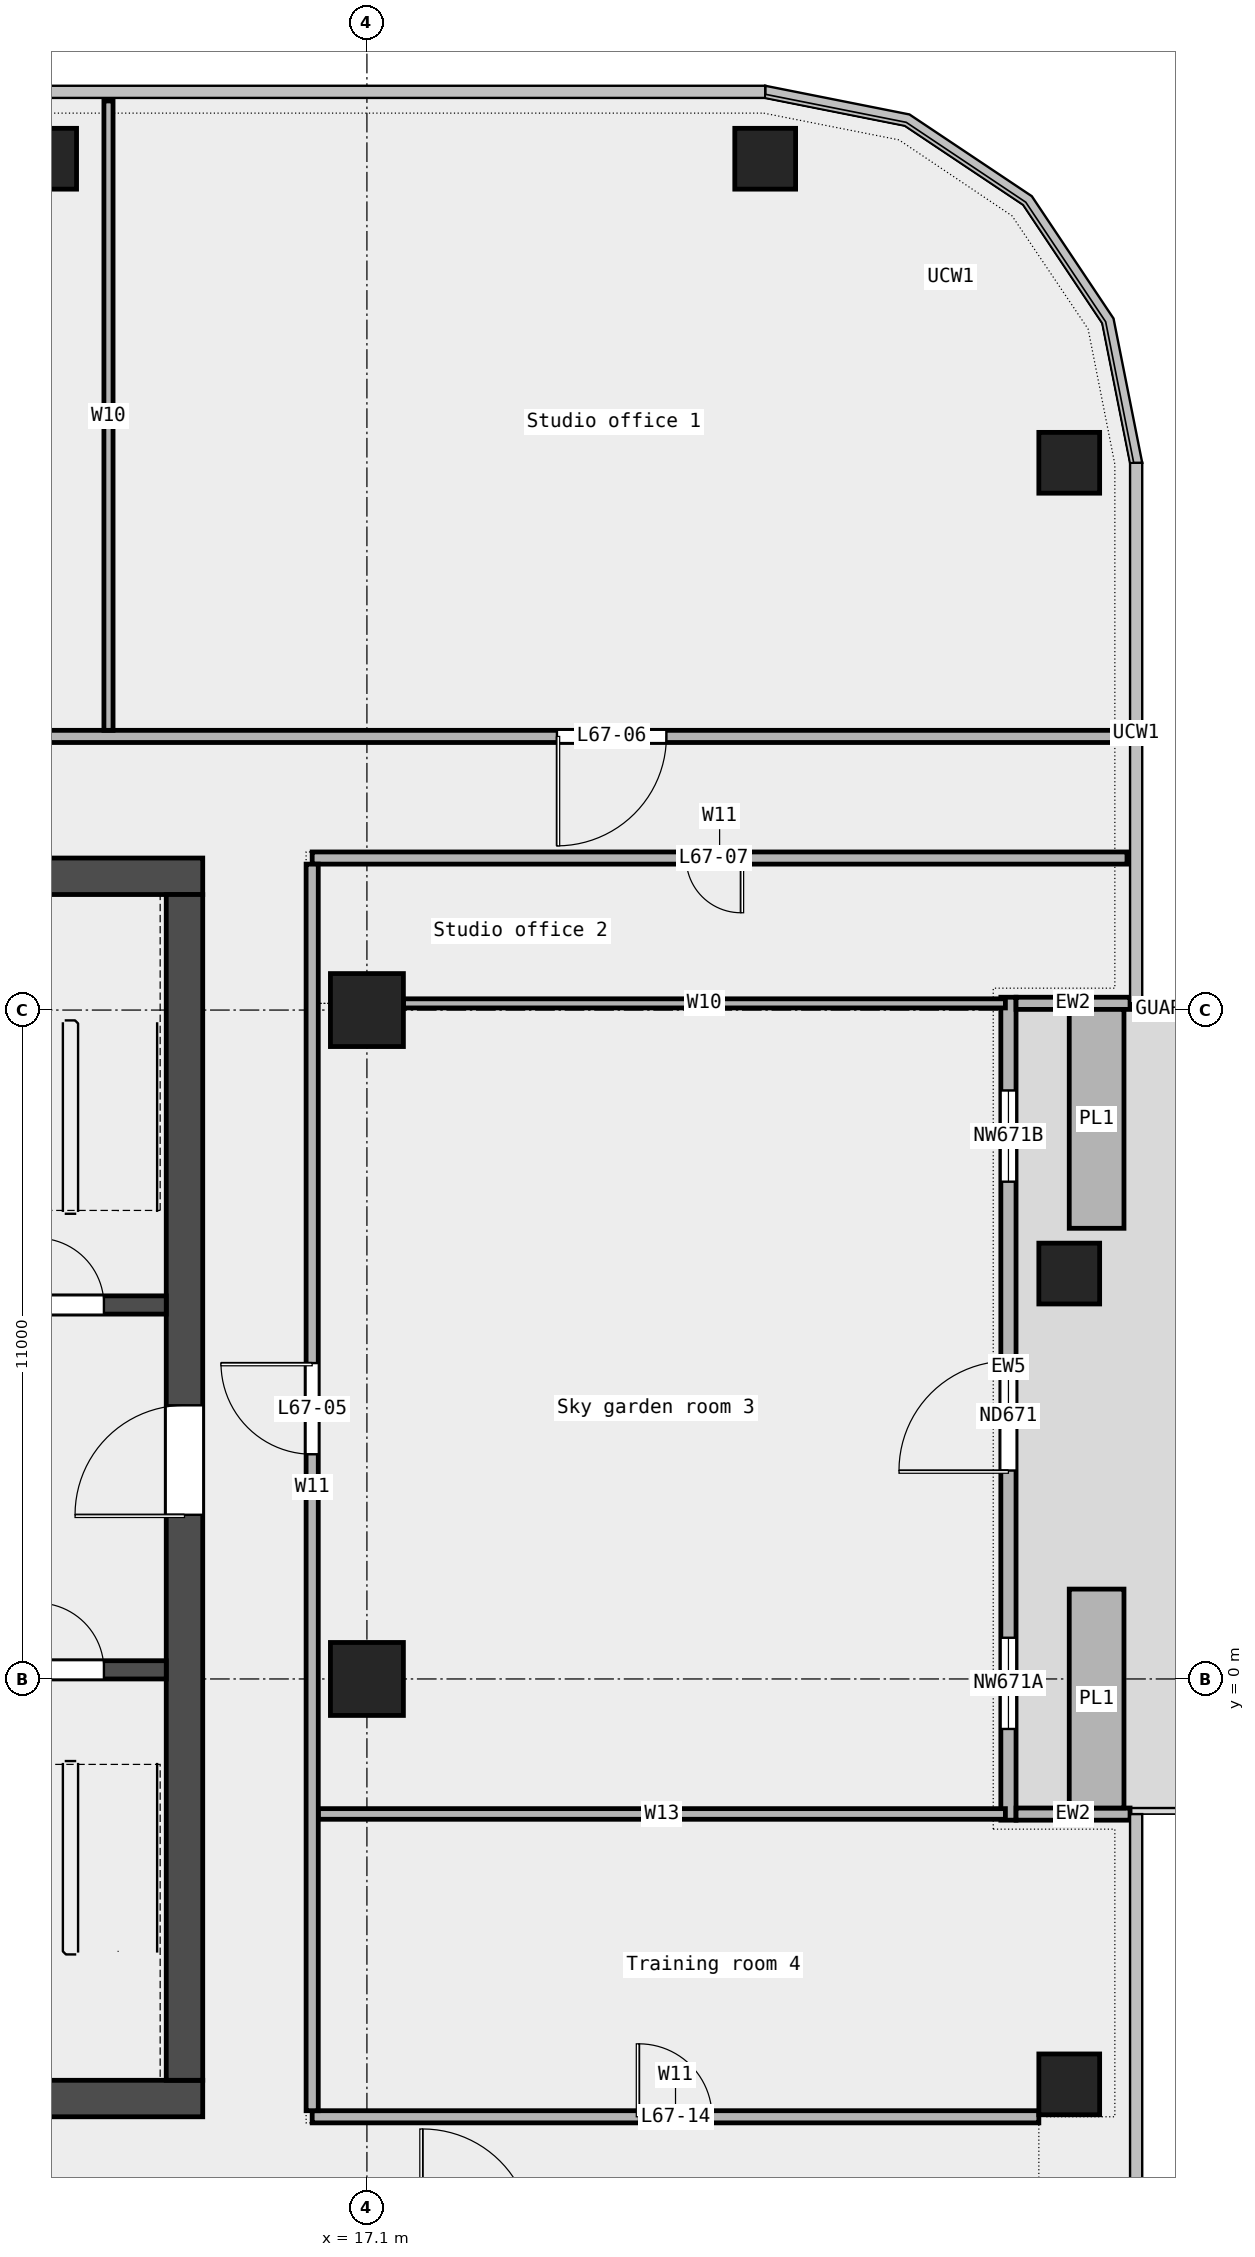
"""IFC4 building model, lengths in metres.
Left out: names, types, materials, properties, quantities, classifications, styles, units other than length and angle.
Written with IfcOpenShell. Run it as: python <this file> out.ifc"""

import sys

from ifc_helpers import new_model, si_unit, direction, frame, frame_2d, origin, origin_2d, place, context, subcontext, project, spatial, rectangle, extrude, element, fill, save


model = new_model("IFC4")
c1 = context("Model", 3, precision=1e-05, world=origin(), true_north=direction((0.0, 1.0)))
c2 = subcontext(c1, "Body", "Model", "MODEL_VIEW")
j1 = project(units=[si_unit("LENGTHUNIT", "METRE"), si_unit("PLANEANGLEUNIT", "RADIAN")], contexts=[c1])
p1 = place(None, origin())
s1 = spatial("IfcSite", under=j1, at=p1, CompositionType="ELEMENT")
p2 = place(p1, origin())
s2 = spatial("IfcBuilding", under=s1, at=p2, CompositionType="ELEMENT")
p3 = place(p2, frame((0.0, 0.0, 307.4)))
s3 = spatial("IfcBuildingStorey", under=s2, at=p3, CompositionType="ELEMENT", Elevation=307.4)
for number, where, z_axis, x_axis in (
    (1, (28.65, -6.667, 0.0), (0.0, 0.0, 1.0), (1.0, 0.0, 0.0)),
    (2, (28.65, 6.667, 0.0), (0.0, 0.0, 1.0), (1.0, 0.0, 0.0)),
    (3, (28.65, 20.0, 0.0), (0.0, 0.0, 1.0), (1.0, 0.0, 0.0)),
    (4, (23.65, 25.0, 0.0), (0.0, 0.0, 1.0), (1.0, 0.0, 0.0)),
    (5, (11.825, 25.0, 0.0), (0.0, 0.0, 1.0), (1.0, 0.0, 0.0)),
):
    element("IfcColumn", number, at=place(p3, frame(where, z_axis=z_axis, x_axis=x_axis)), inside=s3, PredefinedType="COLUMN", context=c2, shape_type="SweptSolid", body=[
        extrude(rectangle(XDim=1.0, YDim=1.0, at=origin_2d()), origin(), (0.0, 0.0, 1.0), 3.6),
    ])
for number, where, z_axis, x_axis in (
    (6, (17.1, 0.0, 0.0), (0.0, 0.0, 1.0), (1.0, 0.0, 0.0)),
    (7, (17.1, 11.0, 0.0), (0.0, 0.0, 1.0), (1.0, 0.0, 0.0)),
):
    element("IfcColumn", number, at=place(p3, frame(where, z_axis=z_axis, x_axis=x_axis)), inside=s3, PredefinedType="COLUMN", context=c2, shape_type="SweptSolid", body=[
        extrude(rectangle(XDim=1.2, YDim=1.2, at=origin_2d()), origin(), (0.0, 0.0, 1.0), 3.6),
    ])
p4 = place(p3, frame((27.65, -2.322, 0.0), z_axis=(0.0, 0.0, 1.0), x_axis=(0.0, 1.0, 0.0)))
e8 = element("IfcWall", 8, at=p4, inside=s3, PredefinedType="STANDARD", context=c2, shape_type="SweptSolid", body=[
    extrude(rectangle(XDim=13.533, YDim=0.25, at=frame_2d((6.767, 0.0))), origin(), (0.0, 0.0, 1.0), 3.6),
])
p5 = place(p4, frame((1.5, 0.0, 0.45)))
e9 = element("IfcOpeningElement", 9, at=p5, cuts=e8, PredefinedType="OPENING", context=c2, shape_type="SweptSolid", body=[
    extrude(rectangle(XDim=1.5, YDim=2.4, at=frame_2d((0.75, 1.2))), frame((0.0, 0.137, 0.0), z_axis=(0.0, -1.0, 0.0), x_axis=(1.0, 0.0, 0.0)), (0.0, 0.0, 1.0), 0.274),
])
p6 = place(p4, frame((5.75, 0.0, 0.0)))
e10 = element("IfcOpeningElement", 10, at=p6, cuts=e8, PredefinedType="OPENING", context=c2, shape_type="SweptSolid", body=[
    extrude(rectangle(XDim=1.8, YDim=2.4, at=frame_2d((0.9, 1.2))), frame((0.0, 0.137, 0.0), z_axis=(0.0, -1.0, 0.0), x_axis=(1.0, 0.0, 0.0)), (0.0, 0.0, 1.0), 0.274),
])
p7 = place(p4, frame((10.5, 0.0, 0.45)))
e11 = element("IfcOpeningElement", 11, at=p7, cuts=e8, PredefinedType="OPENING", context=c2, shape_type="SweptSolid", body=[
    extrude(rectangle(XDim=1.5, YDim=2.4, at=frame_2d((0.75, 1.2))), frame((0.0, 0.137, 0.0), z_axis=(0.0, -1.0, 0.0), x_axis=(1.0, 0.0, 0.0)), (0.0, 0.0, 1.0), 0.274),
])
for number, where, z_axis, x_axis in (
    (12, (29.65, -2.222, 0.0), (0.0, 0.0, 1.0), (-1.0, 0.0, 0.0)),
    (13, (29.65, 11.111, 0.0), (0.0, 0.0, 1.0), (-1.0, 0.0, 0.0)),
):
    element("IfcWall", number, at=place(p3, frame(where, z_axis=z_axis, x_axis=x_axis)), inside=s3, PredefinedType="STANDARD", context=c2, shape_type="SweptSolid", body=[
        extrude(rectangle(XDim=1.875, YDim=0.2, at=frame_2d((0.938, 0.0))), origin(), (0.0, 0.0, 1.0), 3.6),
    ])
for number, where, z_axis, x_axis in (
    (14, (29.1, -2.122, 0.0), (0.0, 0.0, 1.0), (0.0, 1.0, 0.0)),
    (15, (29.1, 7.411, 0.0), (0.0, 0.0, 1.0), (0.0, 1.0, 0.0)),
):
    element("IfcWall", number, at=place(p3, frame(where, z_axis=z_axis, x_axis=x_axis)), inside=s3, PredefinedType="STANDARD", context=c2, shape_type="SweptSolid", body=[
        extrude(rectangle(XDim=3.6, YDim=0.9, at=frame_2d((1.8, 0.0))), origin(), (0.0, 0.0, 1.0), 0.7),
    ])
p8 = place(p3, frame((16.2, -7.2, 0.0), z_axis=(0.0, 0.0, 1.0), x_axis=(1.0, 0.0, 0.0)))
e16 = element("IfcWall", 16, at=p8, inside=s3, PredefinedType="PARTITIONING", context=c2, shape_type="SweptSolid", body=[
    extrude(rectangle(XDim=11.95, YDim=0.2, at=frame_2d((5.975, 0.0))), origin(), (0.0, 0.0, 1.0), 3.6),
])
p9 = place(p8, frame((5.375, 0.0, 0.0)))
e17 = element("IfcOpeningElement", 17, at=p9, cuts=e16, PredefinedType="OPENING", context=c2, shape_type="SweptSolid", body=[
    extrude(rectangle(XDim=1.2, YDim=2.1, at=frame_2d((0.6, 1.05))), frame((0.0, 0.112, 0.0), z_axis=(0.0, -1.0, 0.0), x_axis=(1.0, 0.0, 0.0)), (0.0, 0.0, 1.0), 0.224),
])
p10 = place(p3, frame((16.3, -2.22, 0.0), z_axis=(0.0, 0.0, 1.0), x_axis=(1.0, 0.0, 0.0)))
e18 = element("IfcWall", 18, at=p10, inside=s3, PredefinedType="PARTITIONING", context=c2, shape_type="SweptSolid", body=[
    extrude(rectangle(XDim=11.3, YDim=0.175, at=frame_2d((5.65, 0.0))), origin(), (0.0, 0.0, 1.0), 3.6),
])
p11 = place(p3, frame((17.7, 11.11, 0.0), z_axis=(0.0, 0.0, 1.0), x_axis=(1.0, 0.0, 0.0)))
e19 = element("IfcWall", 19, at=p11, inside=s3, PredefinedType="PARTITIONING", context=c2, shape_type="SweptSolid", body=[
    extrude(rectangle(XDim=9.9, YDim=0.15, at=frame_2d((4.95, 0.0))), origin(), (0.0, 0.0, 1.0), 3.6),
])
p12 = place(p3, frame((16.2, 13.5, 0.0), z_axis=(0.0, 0.0, 1.0), x_axis=(1.0, 0.0, 0.0)))
e20 = element("IfcWall", 20, at=p12, inside=s3, PredefinedType="PARTITIONING", context=c2, shape_type="SweptSolid", body=[
    extrude(rectangle(XDim=13.4, YDim=0.2, at=frame_2d((6.7, 0.0))), origin(), (0.0, 0.0, 1.0), 3.6),
])
p13 = place(p12, frame((6.15, 0.0, 0.0)))
e21 = element("IfcOpeningElement", 21, at=p13, cuts=e20, PredefinedType="OPENING", context=c2, shape_type="SweptSolid", body=[
    extrude(rectangle(XDim=0.9, YDim=2.1, at=frame_2d((0.45, 1.05))), frame((0.0, 0.112, 0.0), z_axis=(0.0, -1.0, 0.0), x_axis=(1.0, 0.0, 0.0)), (0.0, 0.0, 1.0), 0.224),
])
p14 = place(p3, frame((-29.6, 15.5, 0.0), z_axis=(0.0, 0.0, 1.0), x_axis=(1.0, 0.0, 0.0)))
e22 = element("IfcWall", 22, at=p14, inside=s3, PredefinedType="PARTITIONING", context=c2, shape_type="SweptSolid", body=[
    extrude(rectangle(XDim=59.2, YDim=0.2, at=frame_2d((29.6, 0.0))), origin(), (0.0, 0.0, 1.0), 3.6),
])
p15 = place(p14, frame((20.25, 0.0, 0.0)))
e23 = element("IfcOpeningElement", 23, at=p15, cuts=e22, PredefinedType="OPENING", context=c2, shape_type="SweptSolid", body=[
    extrude(rectangle(XDim=1.5, YDim=2.1, at=frame_2d((0.75, 1.05))), frame((0.0, 0.112, 0.0), z_axis=(0.0, -1.0, 0.0), x_axis=(1.0, 0.0, 0.0)), (0.0, 0.0, 1.0), 0.224),
])
p16 = place(p14, frame((49.825, 0.0, 0.0)))
e24 = element("IfcOpeningElement", 24, at=p16, cuts=e22, PredefinedType="OPENING", context=c2, shape_type="SweptSolid", body=[
    extrude(rectangle(XDim=1.8, YDim=2.1, at=frame_2d((0.9, 1.05))), frame((0.0, 0.112, 0.0), z_axis=(0.0, -1.0, 0.0), x_axis=(1.0, 0.0, 0.0)), (0.0, 0.0, 1.0), 0.224),
])
p17 = place(p14, frame((34.05, 0.0, 0.0)))
e25 = element("IfcOpeningElement", 25, at=p17, cuts=e22, PredefinedType="OPENING", context=c2, shape_type="SweptSolid", body=[
    extrude(rectangle(XDim=1.8, YDim=2.1, at=frame_2d((0.9, 1.05))), frame((0.0, 0.112, 0.0), z_axis=(0.0, -1.0, 0.0), x_axis=(1.0, 0.0, 0.0)), (0.0, 0.0, 1.0), 0.224),
])
p18 = place(p14, frame((6.625, 0.0, 0.0)))
e26 = element("IfcOpeningElement", 26, at=p18, cuts=e22, PredefinedType="OPENING", context=c2, shape_type="SweptSolid", body=[
    extrude(rectangle(XDim=1.5, YDim=2.1, at=frame_2d((0.75, 1.05))), frame((0.0, 0.112, 0.0), z_axis=(0.0, -1.0, 0.0), x_axis=(1.0, 0.0, 0.0)), (0.0, 0.0, 1.0), 0.224),
])
p19 = place(p3, frame((12.85, 15.6, 0.0), z_axis=(0.0, 0.0, 1.0), x_axis=(0.0, 1.0, 0.0)))
e27 = element("IfcWall", 27, at=p19, inside=s3, PredefinedType="PARTITIONING", context=c2, shape_type="SweptSolid", body=[
    extrude(rectangle(XDim=10.35, YDim=0.15, at=frame_2d((5.175, 0.0))), origin(), (0.0, 0.0, 1.0), 3.6),
])
p20 = place(p3, frame((16.2, -7.1, 0.0), z_axis=(0.0, 0.0, 1.0), x_axis=(0.0, 1.0, 0.0)))
e28 = element("IfcWall", 28, at=p20, inside=s3, PredefinedType="PARTITIONING", context=c2, shape_type="SweptSolid", body=[
    extrude(rectangle(XDim=20.5, YDim=0.2, at=frame_2d((10.25, 0.0))), origin(), (0.0, 0.0, 1.0), 3.6),
])
p21 = place(p20, frame((10.795, 0.0, 0.0)))
e29 = element("IfcOpeningElement", 29, at=p21, cuts=e28, PredefinedType="OPENING", context=c2, shape_type="SweptSolid", body=[
    extrude(rectangle(XDim=1.5, YDim=2.1, at=frame_2d((0.75, 1.05))), frame((0.0, 0.112, 0.0), z_axis=(0.0, -1.0, 0.0), x_axis=(1.0, 0.0, 0.0)), (0.0, 0.0, 1.0), 0.224),
])
p22 = place(p3, frame((-14.4, -6.9, 0.0), z_axis=(0.0, 0.0, 1.0), x_axis=(1.0, 0.0, 0.0)))
e30 = element("IfcWall", 30, at=p22, inside=s3, PredefinedType="SHEAR", context=c2, shape_type="SweptSolid", body=[
    extrude(rectangle(XDim=28.8, YDim=0.6, at=frame_2d((14.4, 0.0))), origin(), (0.0, 0.0, 1.0), 3.7),
])
p23 = place(p22, frame((4.337, 0.0, 0.0)))
e31 = element("IfcOpeningElement", 31, at=p23, cuts=e30, PredefinedType="OPENING", context=c2, shape_type="SweptSolid", body=[
    extrude(rectangle(XDim=1.0, YDim=2.1, at=frame_2d((0.5, 1.05))), frame((0.0, 0.312, 0.0), z_axis=(0.0, -1.0, 0.0), x_axis=(1.0, 0.0, 0.0)), (0.0, 0.0, 1.0), 0.624),
])
p24 = place(p22, frame((6.212, 0.0, 0.0)))
e32 = element("IfcOpeningElement", 32, at=p24, cuts=e30, PredefinedType="OPENING", context=c2, shape_type="SweptSolid", body=[
    extrude(rectangle(XDim=1.0, YDim=2.1, at=frame_2d((0.5, 1.05))), frame((0.0, 0.312, 0.0), z_axis=(0.0, -1.0, 0.0), x_axis=(1.0, 0.0, 0.0)), (0.0, 0.0, 1.0), 0.624),
])
p25 = place(p22, frame((10.8, 0.0, 0.0)))
e33 = element("IfcOpeningElement", 33, at=p25, cuts=e30, PredefinedType="OPENING", context=c2, shape_type="SweptSolid", body=[
    extrude(rectangle(XDim=1.2, YDim=2.1, at=frame_2d((0.6, 1.05))), frame((0.0, 0.312, 0.0), z_axis=(0.0, -1.0, 0.0), x_axis=(1.0, 0.0, 0.0)), (0.0, 0.0, 1.0), 0.624),
])
p26 = place(p22, frame((15.587, 0.0, 0.0)))
e34 = element("IfcOpeningElement", 34, at=p26, cuts=e30, PredefinedType="OPENING", context=c2, shape_type="SweptSolid", body=[
    extrude(rectangle(XDim=1.0, YDim=2.1, at=frame_2d((0.5, 1.05))), frame((0.0, 0.312, 0.0), z_axis=(0.0, -1.0, 0.0), x_axis=(1.0, 0.0, 0.0)), (0.0, 0.0, 1.0), 0.624),
])
p27 = place(p22, frame((18.75, 0.0, 0.0)))
e35 = element("IfcOpeningElement", 35, at=p27, cuts=e30, PredefinedType="OPENING", context=c2, shape_type="SweptSolid", body=[
    extrude(rectangle(XDim=1.8, YDim=2.1, at=frame_2d((0.9, 1.05))), frame((0.0, 0.312, 0.0), z_axis=(0.0, -1.0, 0.0), x_axis=(1.0, 0.0, 0.0)), (0.0, 0.0, 1.0), 0.624),
])
p28 = place(p22, frame((23.087, 0.0, 0.0)))
e36 = element("IfcOpeningElement", 36, at=p28, cuts=e30, PredefinedType="OPENING", context=c2, shape_type="SweptSolid", body=[
    extrude(rectangle(XDim=1.0, YDim=2.1, at=frame_2d((0.5, 1.05))), frame((0.0, 0.312, 0.0), z_axis=(0.0, -1.0, 0.0), x_axis=(1.0, 0.0, 0.0)), (0.0, 0.0, 1.0), 0.624),
])
p29 = place(p3, frame((-14.4, 13.2, 0.0), z_axis=(0.0, 0.0, 1.0), x_axis=(1.0, 0.0, 0.0)))
e37 = element("IfcWall", 37, at=p29, inside=s3, PredefinedType="SHEAR", context=c2, shape_type="SweptSolid", body=[
    extrude(rectangle(XDim=28.8, YDim=0.6, at=frame_2d((14.4, 0.0))), origin(), (0.0, 0.0, 1.0), 3.7),
])
p30 = place(p29, frame((6.3, 0.0, 0.0)))
e38 = element("IfcOpeningElement", 38, at=p30, cuts=e37, PredefinedType="OPENING", context=c2, shape_type="SweptSolid", body=[
    extrude(rectangle(XDim=1.2, YDim=2.1, at=frame_2d((0.6, 1.05))), frame((0.0, 0.312, 0.0), z_axis=(0.0, -1.0, 0.0), x_axis=(1.0, 0.0, 0.0)), (0.0, 0.0, 1.0), 0.624),
])
p31 = place(p29, frame((21.3, 0.0, 0.0)))
e39 = element("IfcOpeningElement", 39, at=p31, cuts=e37, PredefinedType="OPENING", context=c2, shape_type="SweptSolid", body=[
    extrude(rectangle(XDim=1.2, YDim=2.1, at=frame_2d((0.6, 1.05))), frame((0.0, 0.312, 0.0), z_axis=(0.0, -1.0, 0.0), x_axis=(1.0, 0.0, 0.0)), (0.0, 0.0, 1.0), 0.624),
])
p32 = place(p3, frame((14.1, -6.6, 0.0), z_axis=(0.0, 0.0, 1.0), x_axis=(0.0, 1.0, 0.0)))
e40 = element("IfcWall", 40, at=p32, inside=s3, PredefinedType="SHEAR", context=c2, shape_type="SweptSolid", body=[
    extrude(rectangle(XDim=19.5, YDim=0.6, at=frame_2d((9.75, 0.0))), origin(), (0.0, 0.0, 1.0), 3.7),
])
p33 = place(p32, frame((9.3, 0.0, 0.0)))
e41 = element("IfcOpeningElement", 41, at=p33, cuts=e40, PredefinedType="OPENING", context=c2, shape_type="SweptSolid", body=[
    extrude(rectangle(XDim=1.8, YDim=2.1, at=frame_2d((0.9, 1.05))), frame((0.0, 0.312, 0.0), z_axis=(0.0, -1.0, 0.0), x_axis=(1.0, 0.0, 0.0)), (0.0, 0.0, 1.0), 0.624),
])
p34 = place(p3, frame((10.65, 0.15, 0.0), z_axis=(0.0, 0.0, 1.0), x_axis=(1.0, 0.0, 0.0)))
e42 = element("IfcWall", 42, at=p34, inside=s3, PredefinedType="SOLIDWALL", context=c2, shape_type="SweptSolid", body=[
    extrude(rectangle(XDim=3.15, YDim=0.3, at=frame_2d((1.575, 0.0))), origin(), (0.0, 0.0, 1.0), 3.7),
])
p35 = place(p34, frame((1.025, 0.0, 0.0)))
e43 = element("IfcOpeningElement", 43, at=p35, cuts=e42, PredefinedType="OPENING", context=c2, shape_type="SweptSolid", body=[
    extrude(rectangle(XDim=1.1, YDim=2.1, at=frame_2d((0.55, 1.05))), frame((0.0, 0.162, 0.0), z_axis=(0.0, -1.0, 0.0), x_axis=(1.0, 0.0, 0.0)), (0.0, 0.0, 1.0), 0.324),
])
p36 = place(p3, frame((10.65, 6.15, 0.0), z_axis=(0.0, 0.0, 1.0), x_axis=(1.0, 0.0, 0.0)))
e44 = element("IfcWall", 44, at=p36, inside=s3, PredefinedType="SOLIDWALL", context=c2, shape_type="SweptSolid", body=[
    extrude(rectangle(XDim=3.15, YDim=0.3, at=frame_2d((1.575, 0.0))), origin(), (0.0, 0.0, 1.0), 3.7),
])
p37 = place(p36, frame((1.025, 0.0, 0.0)))
e45 = element("IfcOpeningElement", 45, at=p37, cuts=e44, PredefinedType="OPENING", context=c2, shape_type="SweptSolid", body=[
    extrude(rectangle(XDim=1.1, YDim=2.1, at=frame_2d((0.55, 1.05))), frame((0.0, 0.162, 0.0), z_axis=(0.0, -1.0, 0.0), x_axis=(1.0, 0.0, 0.0)), (0.0, 0.0, 1.0), 0.324),
])
p38 = place(p5, origin())
e46 = element("IfcWindow", 46, at=p38, inside=s3, PartitioningType="SINGLE_PANEL", PredefinedType="WINDOW", context=c2, shape_type="SweptSolid", body=[
    extrude(rectangle(XDim=1.5, YDim=2.4, at=frame_2d((0.75, 1.2))), frame((0.0, 0.03, 0.0), z_axis=(0.0, -1.0, 0.0), x_axis=(1.0, 0.0, 0.0)), (0.0, 0.0, 1.0), 0.06),
])
fill(e9, e46)
p39 = place(p6, origin())
e47 = element("IfcDoor", 47, at=p39, inside=s3, OperationType="DOUBLE_DOOR_SINGLE_SWING", PredefinedType="DOOR", context=c2, shape_type="SweptSolid", body=[
    extrude(rectangle(XDim=1.8, YDim=2.4, at=frame_2d((0.9, 1.2))), frame((0.0, 0.025, 0.0), z_axis=(0.0, -1.0, 0.0), x_axis=(1.0, 0.0, 0.0)), (0.0, 0.0, 1.0), 0.05),
])
fill(e10, e47)
p40 = place(p7, origin())
e48 = element("IfcWindow", 48, at=p40, inside=s3, PartitioningType="SINGLE_PANEL", PredefinedType="WINDOW", context=c2, shape_type="SweptSolid", body=[
    extrude(rectangle(XDim=1.5, YDim=2.4, at=frame_2d((0.75, 1.2))), frame((0.0, 0.03, 0.0), z_axis=(0.0, -1.0, 0.0), x_axis=(1.0, 0.0, 0.0)), (0.0, 0.0, 1.0), 0.06),
])
fill(e11, e48)
p41 = place(p21, origin())
e49 = element("IfcDoor", 49, at=p41, inside=s3, OperationType="DOUBLE_DOOR_SINGLE_SWING", PredefinedType="DOOR", context=c2, shape_type="SweptSolid", body=[
    extrude(rectangle(XDim=1.5, YDim=2.1, at=frame_2d((0.75, 1.05))), frame((0.0, 0.025, 0.0), z_axis=(0.0, -1.0, 0.0), x_axis=(1.0, 0.0, 0.0)), (0.0, 0.0, 1.0), 0.05),
])
fill(e29, e49)
p42 = place(p16, origin())
e50 = element("IfcDoor", 50, at=p42, inside=s3, OperationType="DOUBLE_DOOR_SINGLE_SWING", PredefinedType="DOOR", context=c2, shape_type="SweptSolid", body=[
    extrude(rectangle(XDim=1.8, YDim=2.1, at=frame_2d((0.9, 1.05))), frame((0.0, 0.025, 0.0), z_axis=(0.0, -1.0, 0.0), x_axis=(1.0, 0.0, 0.0)), (0.0, 0.0, 1.0), 0.05),
])
fill(e24, e50)
p43 = place(p13, origin())
e51 = element("IfcDoor", 51, at=p43, inside=s3, OperationType="SINGLE_SWING_LEFT", PredefinedType="DOOR", context=c2, shape_type="SweptSolid", body=[
    extrude(rectangle(XDim=0.9, YDim=2.1, at=frame_2d((0.45, 1.05))), frame((0.0, 0.025, 0.0), z_axis=(0.0, -1.0, 0.0), x_axis=(1.0, 0.0, 0.0)), (0.0, 0.0, 1.0), 0.05),
])
fill(e21, e51)
p44 = place(p9, origin())
e52 = element("IfcDoor", 52, at=p44, inside=s3, OperationType="SINGLE_SWING_LEFT", PredefinedType="DOOR", context=c2, shape_type="SweptSolid", body=[
    extrude(rectangle(XDim=1.2, YDim=2.1, at=frame_2d((0.6, 1.05))), frame((0.0, 0.025, 0.0), z_axis=(0.0, -1.0, 0.0), x_axis=(1.0, 0.0, 0.0)), (0.0, 0.0, 1.0), 0.05),
])
fill(e17, e52)
p45 = place(p35, origin())
e53 = element("IfcDoor", 53, at=p45, inside=s3, OperationType="SINGLE_SWING_RIGHT", PredefinedType="DOOR", context=c2, shape_type="SweptSolid", body=[
    extrude(rectangle(XDim=1.1, YDim=2.1, at=frame_2d((0.55, 1.05))), frame((0.0, 0.025, 0.0), z_axis=(0.0, -1.0, 0.0), x_axis=(1.0, 0.0, 0.0)), (0.0, 0.0, 1.0), 0.05),
])
fill(e43, e53)
p46 = place(p37, origin())
e54 = element("IfcDoor", 54, at=p46, inside=s3, OperationType="SINGLE_SWING_RIGHT", PredefinedType="DOOR", context=c2, shape_type="SweptSolid", body=[
    extrude(rectangle(XDim=1.1, YDim=2.1, at=frame_2d((0.55, 1.05))), frame((0.0, 0.025, 0.0), z_axis=(0.0, -1.0, 0.0), x_axis=(1.0, 0.0, 0.0)), (0.0, 0.0, 1.0), 0.05),
])
fill(e45, e54)
p47 = place(p33, origin())
e55 = element("IfcDoor", 55, at=p47, inside=s3, OperationType="DOUBLE_DOOR_SINGLE_SWING", PredefinedType="DOOR", context=c2, shape_type="SweptSolid", body=[
    extrude(rectangle(XDim=1.8, YDim=2.1, at=frame_2d((0.9, 1.05))), frame((0.0, 0.025, 0.0), z_axis=(0.0, -1.0, 0.0), x_axis=(1.0, 0.0, 0.0)), (0.0, 0.0, 1.0), 0.05),
])
fill(e41, e55)
save(model, sys.argv[1])
